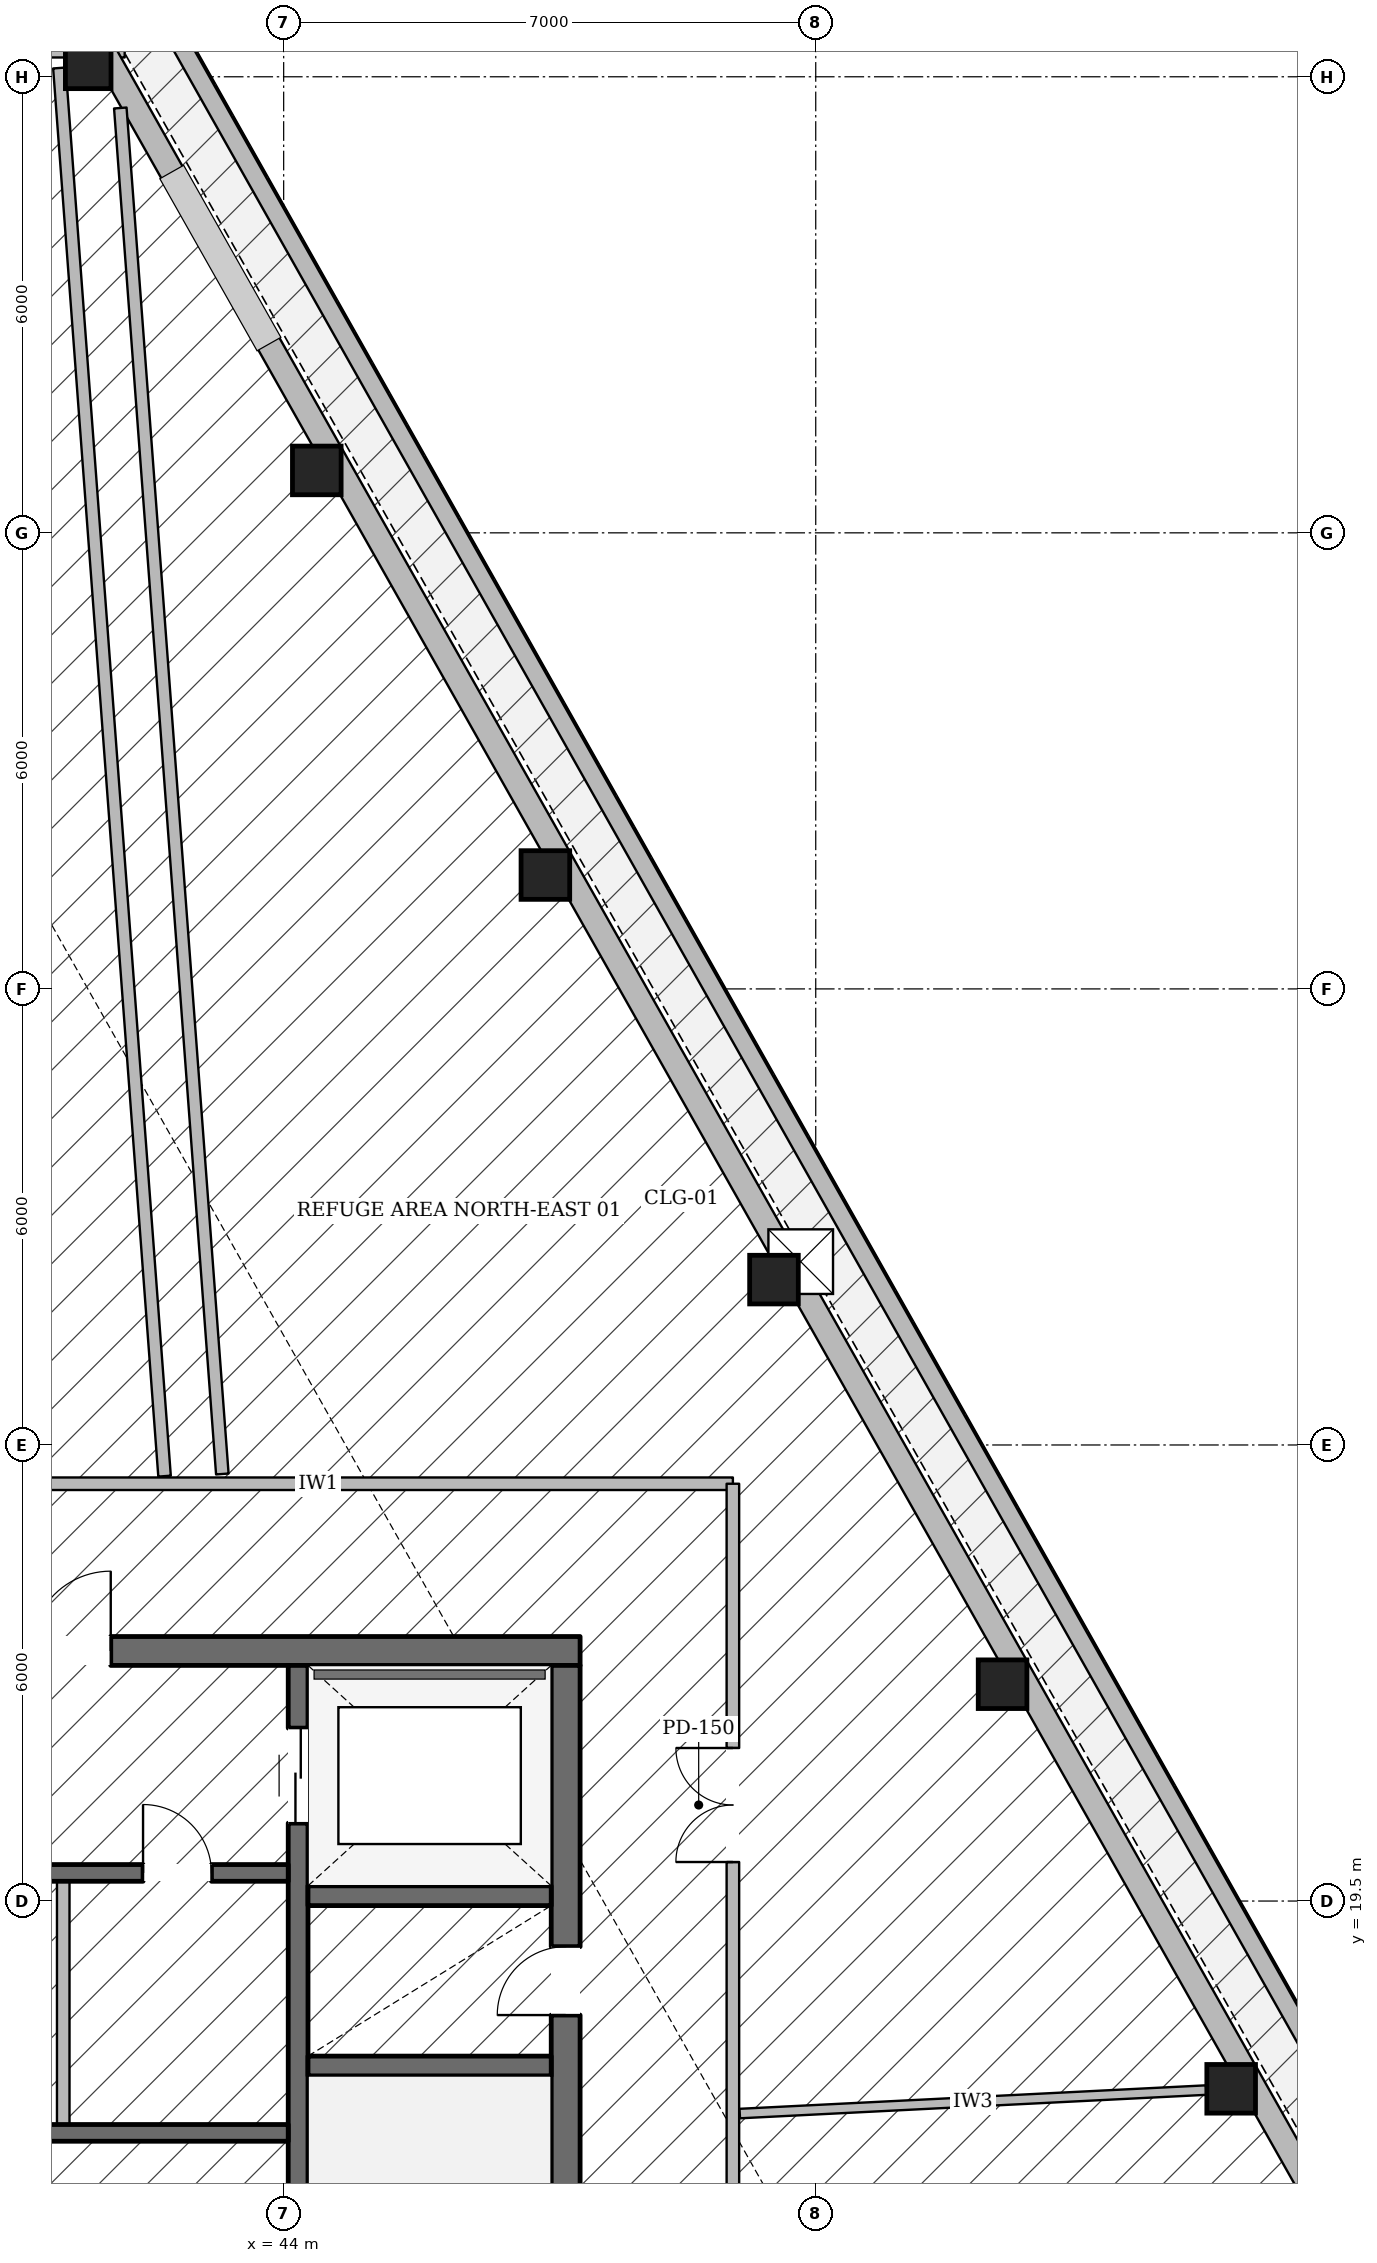
"""IFC4 building model, lengths in metres.
Left out: names, types, materials, properties, quantities, classifications, styles, units other than length and angle.
Written with IfcOpenShell. Run it as: python <this file> out.ifc"""

import sys

from ifc_helpers import new_model, si_unit, direction, frame, frame_2d, origin, origin_2d, place, context, subcontext, project, spatial, rectangle, hollow_rectangle, extrude, element, fill, save


model = new_model("IFC4")
c1 = context("Model", 3, precision=1e-05, world=origin(), true_north=direction((0.0, 1.0)))
c2 = subcontext(c1, "Body", "Model", "MODEL_VIEW")
j1 = project(units=[si_unit("LENGTHUNIT", "METRE"), si_unit("PLANEANGLEUNIT", "RADIAN")], contexts=[c1])
p1 = place(None, origin())
s1 = spatial("IfcSite", under=j1, at=p1, CompositionType="ELEMENT")
p2 = place(p1, origin())
s2 = spatial("IfcBuilding", under=s1, at=p2, CompositionType="ELEMENT")
p3 = place(p2, frame((0.0, 0.0, 234.3)))
s3 = spatial("IfcBuildingStorey", under=s2, at=p3, CompositionType="ELEMENT", Elevation=234.3)
p4 = place(p3, frame((28.1, 22.79, 0.0), z_axis=(0.0, 0.0, 1.0), x_axis=(1.0, 0.0, 0.0)))
e1 = element("IfcWall", 1, at=p4, inside=s3, PredefinedType="SOLIDWALL", context=c2, shape_type="SweptSolid", body=[
    extrude(rectangle(XDim=19.8, YDim=0.38, at=frame_2d((9.9, 0.0))), origin(), (0.0, 0.0, 1.0), 4.96),
])
p5 = place(p4, frame((6.175, 0.0, 0.0)))
e2 = element("IfcOpeningElement", 2, at=p5, cuts=e1, PredefinedType="OPENING", context=c2, shape_type="SweptSolid", body=[
    extrude(rectangle(XDim=1.05, YDim=2.15, at=frame_2d((0.525, 1.075))), frame((0.0, 0.2, 0.0), z_axis=(0.0, -1.0, 0.0), x_axis=(1.0, 0.0, 0.0)), (0.0, 0.0, 1.0), 0.4),
])
p6 = place(p4, frame((12.575, 0.0, 0.0)))
e3 = element("IfcOpeningElement", 3, at=p6, cuts=e1, PredefinedType="OPENING", context=c2, shape_type="SweptSolid", body=[
    extrude(rectangle(XDim=1.05, YDim=2.15, at=frame_2d((0.525, 1.075))), frame((0.0, 0.2, 0.0), z_axis=(0.0, -1.0, 0.0), x_axis=(1.0, 0.0, 0.0)), (0.0, 0.0, 1.0), 0.4),
])
p7 = place(p3, frame((47.71, 9.6, 0.0), z_axis=(0.0, 0.0, 1.0), x_axis=(0.0, 1.0, 0.0)))
e4 = element("IfcWall", 4, at=p7, inside=s3, PredefinedType="SOLIDWALL", context=c2, shape_type="SweptSolid", body=[
    extrude(rectangle(XDim=13.0, YDim=0.38, at=frame_2d((6.5, 0.0))), origin(), (0.0, 0.0, 1.0), 4.96),
])
p8 = place(p7, frame((0.2, 0.0, 0.0)))
e5 = element("IfcOpeningElement", 5, at=p8, cuts=e4, PredefinedType="OPENING", context=c2, shape_type="SweptSolid", body=[
    extrude(rectangle(XDim=1.1, YDim=2.15, at=frame_2d((0.55, 1.075))), frame((0.0, 0.2, 0.0), z_axis=(0.0, -1.0, 0.0), x_axis=(1.0, 0.0, 0.0)), (0.0, 0.0, 1.0), 0.4),
])
p9 = place(p7, frame((8.4, 0.0, 0.0)))
e6 = element("IfcOpeningElement", 6, at=p9, cuts=e4, PredefinedType="OPENING", context=c2, shape_type="SweptSolid", body=[
    extrude(rectangle(XDim=0.9, YDim=2.1, at=frame_2d((0.45, 1.05))), frame((0.0, 0.2, 0.0), z_axis=(0.0, -1.0, 0.0), x_axis=(1.0, 0.0, 0.0)), (0.0, 0.0, 1.0), 0.4),
])
p10 = place(p3, frame((44.19, 9.6, 0.0), z_axis=(0.0, 0.0, 1.0), x_axis=(0.0, 1.0, 0.0)))
e7 = element("IfcWall", 7, at=p10, inside=s3, PredefinedType="SHEAR", context=c2, shape_type="SweptSolid", body=[
    extrude(rectangle(XDim=13.0, YDim=0.26, at=frame_2d((6.5, 0.0))), origin(), (0.0, 0.0, 1.0), 4.96),
])
p11 = place(p10, frame((10.925, 0.0, 0.0)))
e8 = element("IfcOpeningElement", 8, at=p11, cuts=e7, PredefinedType="OPENING", context=c2, shape_type="SweptSolid", body=[
    extrude(rectangle(XDim=1.25, YDim=2.25, at=frame_2d((0.625, 1.125))), frame((0.0, 0.14, 0.0), z_axis=(0.0, -1.0, 0.0), x_axis=(1.0, 0.0, 0.0)), (0.0, 0.0, 1.0), 0.28),
])
for number, where, z_axis, x_axis in (
    (9, (44.32, 17.33, 0.0), (0.0, 0.0, 1.0), (1.0, 0.0, 0.0)),
    (10, (44.32, 19.57, 0.0), (0.0, 0.0, 1.0), (1.0, 0.0, 0.0)),
):
    element("IfcWall", number, at=place(p3, frame(where, z_axis=z_axis, x_axis=x_axis)), inside=s3, PredefinedType="SHEAR", context=c2, shape_type="SweptSolid", body=[
        extrude(rectangle(XDim=3.2, YDim=0.26, at=frame_2d((1.6, 0.0))), origin(), (0.0, 0.0, 1.0), 4.96),
    ])
p12 = place(p3, frame((31.94, 19.87, 0.0), z_axis=(0.0, 0.0, 1.0), x_axis=(1.0, 0.0, 0.0)))
e11 = element("IfcWall", 11, at=p12, inside=s3, PredefinedType="SOLIDWALL", context=c2, shape_type="SweptSolid", body=[
    extrude(rectangle(XDim=12.12, YDim=0.22, at=frame_2d((6.06, 0.0))), origin(), (0.0, 0.0, 1.0), 4.96),
])
p13 = place(p12, frame((6.3, 0.0, 0.0)))
e12 = element("IfcOpeningElement", 12, at=p13, cuts=e11, PredefinedType="OPENING", context=c2, shape_type="SweptSolid", body=[
    extrude(rectangle(XDim=1.1, YDim=2.15, at=frame_2d((0.55, 1.075))), frame((0.0, 0.12, 0.0), z_axis=(0.0, -1.0, 0.0), x_axis=(1.0, 0.0, 0.0)), (0.0, 0.0, 1.0), 0.24),
])
p14 = place(p12, frame((8.01, 0.0, 0.0)))
e13 = element("IfcOpeningElement", 13, at=p14, cuts=e11, PredefinedType="OPENING", context=c2, shape_type="SweptSolid", body=[
    extrude(rectangle(XDim=0.9, YDim=2.1, at=frame_2d((0.45, 1.05))), frame((0.0, 0.12, 0.0), z_axis=(0.0, -1.0, 0.0), x_axis=(1.0, 0.0, 0.0)), (0.0, 0.0, 1.0), 0.24),
])
p15 = place(p12, frame((10.21, 0.0, 0.0)))
e14 = element("IfcOpeningElement", 14, at=p15, cuts=e11, PredefinedType="OPENING", context=c2, shape_type="SweptSolid", body=[
    extrude(rectangle(XDim=0.9, YDim=2.1, at=frame_2d((0.45, 1.05))), frame((0.0, 0.12, 0.0), z_axis=(0.0, -1.0, 0.0), x_axis=(1.0, 0.0, 0.0)), (0.0, 0.0, 1.0), 0.24),
])
p16 = place(p3, frame((31.94, 16.45, 0.0), z_axis=(0.0, 0.0, 1.0), x_axis=(1.0, 0.0, 0.0)))
e15 = element("IfcWall", 15, at=p16, inside=s3, PredefinedType="SOLIDWALL", context=c2, shape_type="SweptSolid", body=[
    extrude(rectangle(XDim=12.12, YDim=0.22, at=frame_2d((6.06, 0.0))), origin(), (0.0, 0.0, 1.0), 4.96),
])
for number, where, z_axis, x_axis in (
    (16, (56.465, 17.03, 0.0), (0.0, 0.0, 1.0), (1.0, 0.0, 0.0)),
    (17, (53.458, 22.353, 0.0), (0.0, 0.0, 1.0), (1.0, 0.0, 0.0)),
    (18, (50.451, 27.676, 0.0), (0.0, 0.0, 1.0), (1.0, 0.0, 0.0)),
    (19, (47.443, 32.998, 0.0), (0.0, 0.0, 1.0), (1.0, 0.0, 0.0)),
    (20, (44.436, 38.321, 0.0), (0.0, 0.0, 1.0), (1.0, 0.0, 0.0)),
):
    element("IfcColumn", number, at=place(p3, frame(where, z_axis=z_axis, x_axis=x_axis)), inside=s3, PredefinedType="COLUMN", context=c2, shape_type="SweptSolid", body=[
        extrude(hollow_rectangle(XDim=0.64, YDim=0.64, WallThickness=0.028, at=origin_2d()), origin(), (0.0, 0.0, 1.0), 4.96),
    ])
p17 = place(p3, frame((41.428, 43.644, 0.0), z_axis=(0.0, 0.0, 1.0), x_axis=(1.0, 0.0, 0.0)))
e21 = element("IfcColumn", 21, at=p17, inside=s3, PredefinedType="COLUMN", context=c2, shape_type="SweptSolid", body=[
    extrude(hollow_rectangle(XDim=0.6, YDim=0.6, WallThickness=0.028, at=origin_2d()), origin(), (0.0, 0.0, 1.0), 4.96),
])
p18 = place(p3, frame((34.092, 43.914, 0.0), z_axis=(0.0, 0.0, 1.0), x_axis=(1.0, 0.0, 0.0)))
e22 = element("IfcWall", 22, at=p18, inside=s3, PredefinedType="STANDARD", context=c2, shape_type="SweptSolid", body=[
    extrude(rectangle(XDim=7.817, YDim=0.32, at=frame_2d((3.908, 0.0))), origin(), (0.0, 0.0, 1.0), 3.652),
])
p19 = place(p3, frame((41.427, 44.195, 0.0), z_axis=(0.0, 0.0, 1.0), x_axis=(0.491919583937, -0.87064063938, 0.0)))
e23 = element("IfcWall", 23, at=p19, inside=s3, PredefinedType="STANDARD", context=c2, shape_type="SweptSolid", body=[
    extrude(rectangle(XDim=37.633, YDim=0.32, at=frame_2d((18.816, 0.0))), origin(), (0.0, 0.0, 1.0), 3.652),
])
p20 = place(p3, frame((61.098, 11.212, 0.0), z_axis=(0.0, 0.0, 1.0), x_axis=(-0.491296283938, 0.870992515117, 0.0)))
e24 = element("IfcWall", 24, at=p20, inside=s3, PredefinedType="PARAPET", context=c2, shape_type="SweptSolid", body=[
    extrude(rectangle(XDim=39.283, YDim=0.24, at=frame_2d((19.642, 0.0))), origin(), (0.0, 0.0, 1.0), 1.25),
])
p21 = place(p3, frame((41.1, 16.56, 0.0), z_axis=(0.0, 0.0, 1.0), x_axis=(0.0, 1.0, 0.0)))
e25 = element("IfcWall", 25, at=p21, inside=s3, PredefinedType="PARTITIONING", context=c2, shape_type="SweptSolid", body=[
    extrude(rectangle(XDim=3.2, YDim=0.165, at=frame_2d((1.6, 0.0))), origin(), (0.0, 0.0, 1.0), 4.96),
])
p22 = place(p3, frame((26.09, 24.99, 0.0), z_axis=(0.0, 0.0, 1.0), x_axis=(1.0, 0.0, 0.0)))
e26 = element("IfcWall", 26, at=p22, inside=s3, PredefinedType="PARTITIONING", context=c2, shape_type="SweptSolid", body=[
    extrude(rectangle(XDim=23.82, YDim=0.165, at=frame_2d((11.91, 0.0))), origin(), (0.0, 0.0, 1.0), 4.96),
])
p23 = place(p22, frame((11.16, 0.0, 0.0)))
e27 = element("IfcOpeningElement", 27, at=p23, cuts=e26, PredefinedType="OPENING", context=c2, shape_type="SweptSolid", body=[
    extrude(rectangle(XDim=1.5, YDim=2.25, at=frame_2d((0.75, 1.125))), frame((0.0, 0.093, 0.0), z_axis=(0.0, -1.0, 0.0), x_axis=(1.0, 0.0, 0.0)), (0.0, 0.0, 1.0), 0.185),
])
p24 = place(p22, frame((2.687, 0.0, 0.0)))
e28 = element("IfcOpeningElement", 28, at=p24, cuts=e26, PredefinedType="OPENING", context=c2, shape_type="SweptSolid", body=[
    extrude(rectangle(XDim=1.5, YDim=2.25, at=frame_2d((0.75, 1.125))), frame((0.0, 0.093, 0.0), z_axis=(0.0, -1.0, 0.0), x_axis=(1.0, 0.0, 0.0)), (0.0, 0.0, 1.0), 0.185),
])
p25 = place(p3, frame((49.91, 7.21, 0.0), z_axis=(0.0, 0.0, 1.0), x_axis=(0.0, 1.0, 0.0)))
e29 = element("IfcWall", 29, at=p25, inside=s3, PredefinedType="PARTITIONING", context=c2, shape_type="SweptSolid", body=[
    extrude(rectangle(XDim=17.78, YDim=0.165, at=frame_2d((8.89, 0.0))), origin(), (0.0, 0.0, 1.0), 4.699),
])
p26 = place(p25, frame((12.803, 0.0, 0.0)))
e30 = element("IfcOpeningElement", 30, at=p26, cuts=e29, PredefinedType="OPENING", context=c2, shape_type="SweptSolid", body=[
    extrude(rectangle(XDim=1.5, YDim=2.25, at=frame_2d((0.75, 1.125))), frame((0.0, 0.093, 0.0), z_axis=(0.0, -1.0, 0.0), x_axis=(1.0, 0.0, 0.0)), (0.0, 0.0, 1.0), 0.185),
])
p27 = place(p25, frame((1.028, 0.0, 0.0)))
e31 = element("IfcOpeningElement", 31, at=p27, cuts=e29, PredefinedType="OPENING", context=c2, shape_type="SweptSolid", body=[
    extrude(rectangle(XDim=1.5, YDim=2.25, at=frame_2d((0.75, 1.125))), frame((0.0, 0.093, 0.0), z_axis=(0.0, -1.0, 0.0), x_axis=(1.0, 0.0, 0.0)), (0.0, 0.0, 1.0), 0.185),
])
p28 = place(p25, frame((5.841, 0.0, 0.0)))
e32 = element("IfcOpeningElement", 32, at=p28, cuts=e29, PredefinedType="OPENING", context=c2, shape_type="SweptSolid", body=[
    extrude(rectangle(XDim=1.5, YDim=2.25, at=frame_2d((0.75, 1.125))), frame((0.0, 0.093, 0.0), z_axis=(0.0, -1.0, 0.0), x_axis=(1.0, 0.0, 0.0)), (0.0, 0.0, 1.0), 0.185),
])
p29 = place(p3, frame((42.433, 25.09, 0.0), z_axis=(0.0, 0.0, 1.0), x_axis=(-0.074476298328, 0.997222784029, 0.0)))
e33 = element("IfcWall", 33, at=p29, inside=s3, PredefinedType="PARTITIONING", context=c2, shape_type="SweptSolid", body=[
    extrude(rectangle(XDim=18.577, YDim=0.165, at=frame_2d((9.289, 0.0))), origin(), (0.0, 0.0, 1.0), 4.96),
])
p30 = place(p3, frame((43.193, 25.118, 0.0), z_axis=(0.0, 0.0, 1.0), x_axis=(-0.074484472145, 0.997222173545, 0.0)))
e34 = element("IfcWall", 34, at=p30, inside=s3, PredefinedType="PARTITIONING", context=c2, shape_type="SweptSolid", body=[
    extrude(rectangle(XDim=18.021, YDim=0.165, at=frame_2d((9.01, 0.0))), origin(), (0.0, 0.0, 1.0), 3.655),
])
p31 = place(p3, frame((50.0, 16.704, 0.0), z_axis=(0.0, 0.0, 1.0), x_axis=(0.998734141149, 0.050300251529, 0.0)))
e35 = element("IfcWall", 35, at=p31, inside=s3, PredefinedType="PARTITIONING", context=c2, shape_type="SweptSolid", body=[
    extrude(rectangle(XDim=6.145, YDim=0.125, at=frame_2d((3.072, 0.0))), origin(), (0.0, 0.0, 1.0), 3.655),
])
p32 = place(p3, frame((0.0, 0.0, -0.22)))
p33 = place(p32, frame((50.802, 27.912, 0.0)))
p34 = place(p33, frame((0.0, 0.0, 0.17)))
e36 = element("IfcWindow", 36, at=p34, inside=s3, PartitioningType="SINGLE_PANEL", PredefinedType="SKYLIGHT", context=c2, shape_type="SweptSolid", body=[
    extrude(rectangle(XDim=0.85, YDim=0.85, at=origin_2d()), origin(), (0.0, 0.0, 1.0), 0.05),
])
p35 = place(p9, origin())
e37 = element("IfcDoor", 37, at=p35, inside=s3, OperationType="SINGLE_SWING_LEFT", PredefinedType="DOOR", context=c2, shape_type="SweptSolid", body=[
    extrude(rectangle(XDim=0.9, YDim=2.1, at=frame_2d((0.45, 1.05))), frame((0.0, 0.025, 0.0), z_axis=(0.0, -1.0, 0.0), x_axis=(1.0, 0.0, 0.0)), (0.0, 0.0, 1.0), 0.05),
])
fill(e6, e37)
p36 = place(p6, origin())
e38 = element("IfcDoor", 38, at=p36, inside=s3, OperationType="SINGLE_SWING_RIGHT", PredefinedType="DOOR", context=c2, shape_type="SweptSolid", body=[
    extrude(rectangle(XDim=1.05, YDim=2.15, at=frame_2d((0.525, 1.075))), frame((0.0, 0.025, 0.0), z_axis=(0.0, -1.0, 0.0), x_axis=(1.0, 0.0, 0.0)), (0.0, 0.0, 1.0), 0.05),
])
fill(e3, e38)
p37 = place(p11, origin())
e39 = element("IfcDoor", 39, at=p37, inside=s3, OperationType="DOUBLE_DOOR_SLIDING", PredefinedType="DOOR", context=c2, shape_type="SweptSolid", body=[
    extrude(rectangle(XDim=1.25, YDim=2.25, at=frame_2d((0.625, 1.125))), frame((0.0, 0.025, 0.0), z_axis=(0.0, -1.0, 0.0), x_axis=(1.0, 0.0, 0.0)), (0.0, 0.0, 1.0), 0.05),
])
fill(e8, e39)
p38 = place(p15, origin())
e40 = element("IfcDoor", 40, at=p38, inside=s3, OperationType="SINGLE_SWING_LEFT", PredefinedType="DOOR", context=c2, shape_type="SweptSolid", body=[
    extrude(rectangle(XDim=0.9, YDim=2.1, at=frame_2d((0.45, 1.05))), frame((0.0, 0.025, 0.0), z_axis=(0.0, -1.0, 0.0), x_axis=(1.0, 0.0, 0.0)), (0.0, 0.0, 1.0), 0.05),
])
fill(e14, e40)
p39 = place(p26, origin())
e41 = element("IfcDoor", 41, at=p39, inside=s3, OperationType="DOUBLE_DOOR_SINGLE_SWING", PredefinedType="DOOR", context=c2, shape_type="SweptSolid", body=[
    extrude(rectangle(XDim=1.5, YDim=2.25, at=frame_2d((0.75, 1.125))), frame((0.0, 0.025, 0.0), z_axis=(0.0, -1.0, 0.0), x_axis=(1.0, 0.0, 0.0)), (0.0, 0.0, 1.0), 0.05),
])
fill(e30, e41)
save(model, sys.argv[1])
